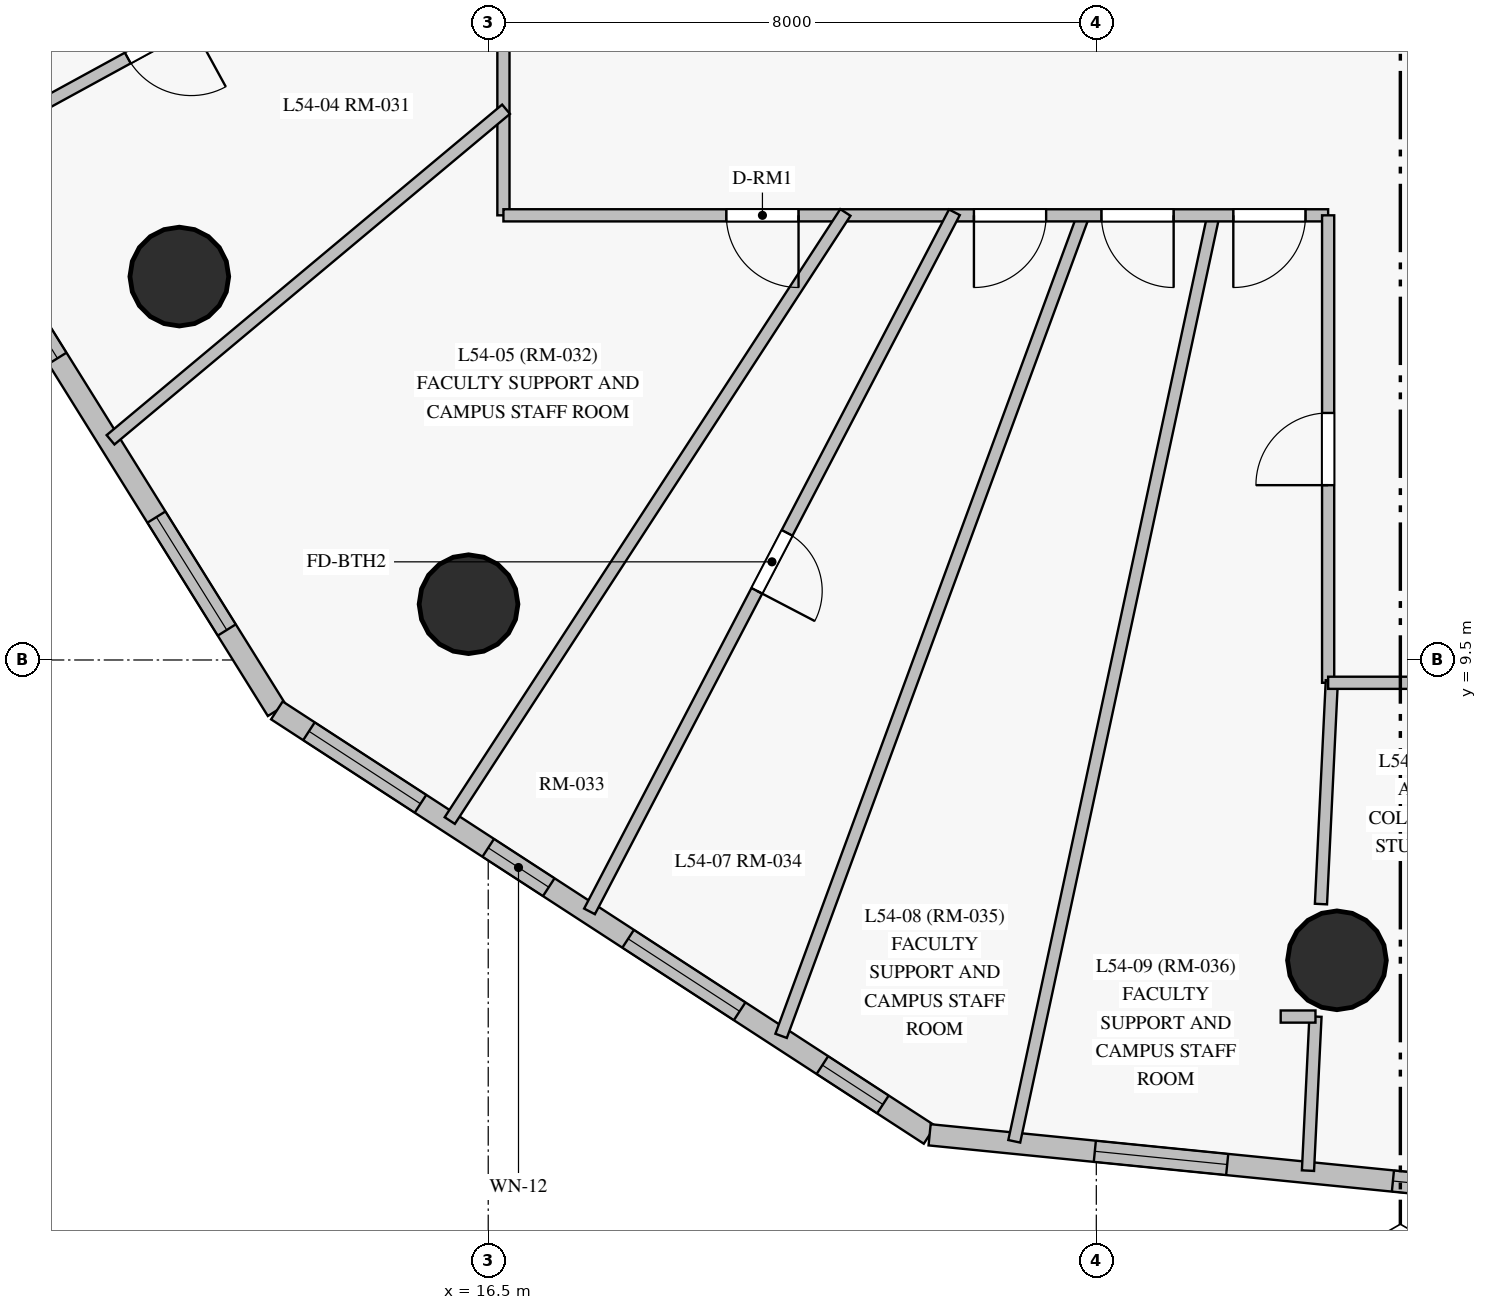
"""IFC4 building model, lengths in metres.
Left out: names, types, materials, properties, quantities, classifications, styles, units other than length and angle.
Written with IfcOpenShell. Run it as: python <this file> out.ifc"""

import sys

from ifc_helpers import new_model, si_unit, direction, frame, frame_2d, origin, origin_with_axes, origin_2d, place, context, subcontext, project, spatial, rectangle, circle, extrude, source, transform, mapped, element, fill, save


model = new_model("IFC4")
c1 = context("Model", 3, precision=1e-05, world=origin(), true_north=direction((0.0, 1.0)))
c2 = subcontext(c1, "Body", "Model", "MODEL_VIEW")
j1 = project(units=[si_unit("LENGTHUNIT", "METRE"), si_unit("PLANEANGLEUNIT", "RADIAN")], contexts=[c1])
p1 = place(None, origin())
s1 = spatial("IfcSite", under=j1, at=p1, CompositionType="ELEMENT")
p2 = place(p1, origin())
s2 = spatial("IfcBuilding", under=s1, at=p2, CompositionType="ELEMENT")
p3 = place(p2, frame((0.0, 0.0, 187.05)))
s3 = spatial("IfcBuildingStorey", under=s2, at=p3, CompositionType="ELEMENT", Elevation=187.05)
m1 = source(origin_with_axes(), c2, "Body", "SweptSolid", [
    extrude(circle(Radius=0.65, at=origin_2d()), origin(), (0.0, 0.0, 1.0), 3.05),
])
for number, where, z_axis, x_axis in (
    (1, (12.436, 14.544, 0.0), (0.0, 0.0, 1.0), (1.0, 0.0, 0.0)),
    (2, (16.241, 10.234, 0.0), (0.0, 0.0, 1.0), (1.0, 0.0, 0.0)),
    (3, (27.666, 5.549, 0.0), (0.0, 0.0, 1.0), (1.0, 0.0, 0.0)),
):
    element("IfcColumn", number, at=place(p3, frame(where, z_axis=z_axis, x_axis=x_axis)), inside=s3, PredefinedType="COLUMN", context=c2, shape_type="MappedRepresentation", body=[
        mapped(m1, transform((0.0, 0.0, 0.0), scale=1.0)),
    ])
p4 = place(p3, frame((6.184, 20.929, 0.0), z_axis=(0.0, 0.0, 1.0), x_axis=(0.52888179639, -0.848695496304, 0.0)))
e4 = element("IfcWall", 4, at=p4, inside=s3, PredefinedType="SOLIDWALL", context=c2, shape_type="SweptSolid", body=[
    extrude(rectangle(XDim=14.248, YDim=0.28, at=frame_2d((7.124, 0.0))), origin(), (0.0, 0.0, 1.0), 2.825),
])
p5 = place(p4, frame((2.403, 0.0, 0.85)))
e5 = element("IfcOpeningElement", 5, at=p5, cuts=e4, PredefinedType="OPENING", context=c2, shape_type="SweptSolid", body=[
    extrude(rectangle(XDim=1.75, YDim=1.65, at=frame_2d((0.875, 0.825))), frame((0.0, 0.15, 0.0), z_axis=(0.0, -1.0, 0.0), x_axis=(1.0, 0.0, 0.0)), (0.0, 0.0, 1.0), 0.3),
])
p6 = place(p4, frame((7.04, 0.0, 0.85)))
e6 = element("IfcOpeningElement", 6, at=p6, cuts=e4, PredefinedType="OPENING", context=c2, shape_type="SweptSolid", body=[
    extrude(rectangle(XDim=1.75, YDim=1.65, at=frame_2d((0.875, 0.825))), frame((0.0, 0.15, 0.0), z_axis=(0.0, -1.0, 0.0), x_axis=(1.0, 0.0, 0.0)), (0.0, 0.0, 1.0), 0.3),
])
p7 = place(p4, frame((11.251, 0.0, 0.85)))
e7 = element("IfcOpeningElement", 7, at=p7, cuts=e4, PredefinedType="OPENING", context=c2, shape_type="SweptSolid", body=[
    extrude(rectangle(XDim=1.75, YDim=1.65, at=frame_2d((0.875, 0.825))), frame((0.0, 0.15, 0.0), z_axis=(0.0, -1.0, 0.0), x_axis=(1.0, 0.0, 0.0)), (0.0, 0.0, 1.0), 0.3),
])
p8 = place(p3, frame((13.719, 8.837, 0.0), z_axis=(0.0, 0.0, 1.0), x_axis=(0.838379351777, -0.545087206339, 0.0)))
e8 = element("IfcWall", 8, at=p8, inside=s3, PredefinedType="SOLIDWALL", context=c2, shape_type="SweptSolid", body=[
    extrude(rectangle(XDim=10.243, YDim=0.28, at=frame_2d((5.122, 0.0))), origin(), (0.0, 0.0, 1.0), 2.825),
])
p9 = place(p8, frame((0.503, 0.0, 0.85)))
e9 = element("IfcOpeningElement", 9, at=p9, cuts=e8, PredefinedType="OPENING", context=c2, shape_type="SweptSolid", body=[
    extrude(rectangle(XDim=1.75, YDim=1.65, at=frame_2d((0.875, 0.825))), frame((0.0, 0.15, 0.0), z_axis=(0.0, -1.0, 0.0), x_axis=(1.0, 0.0, 0.0)), (0.0, 0.0, 1.0), 0.3),
])
p10 = place(p8, frame((3.316, 0.0, 0.85)))
e10 = element("IfcOpeningElement", 10, at=p10, cuts=e8, PredefinedType="OPENING", context=c2, shape_type="SweptSolid", body=[
    extrude(rectangle(XDim=0.95, YDim=1.5, at=frame_2d((0.475, 0.75))), frame((0.0, 0.15, 0.0), z_axis=(0.0, -1.0, 0.0), x_axis=(1.0, 0.0, 0.0)), (0.0, 0.0, 1.0), 0.3),
])
p11 = place(p8, frame((5.512, 0.0, 0.85)))
e11 = element("IfcOpeningElement", 11, at=p11, cuts=e8, PredefinedType="OPENING", context=c2, shape_type="SweptSolid", body=[
    extrude(rectangle(XDim=1.75, YDim=1.65, at=frame_2d((0.875, 0.825))), frame((0.0, 0.15, 0.0), z_axis=(0.0, -1.0, 0.0), x_axis=(1.0, 0.0, 0.0)), (0.0, 0.0, 1.0), 0.3),
])
p12 = place(p8, frame((8.56, 0.0, 0.85)))
e12 = element("IfcOpeningElement", 12, at=p12, cuts=e8, PredefinedType="OPENING", context=c2, shape_type="SweptSolid", body=[
    extrude(rectangle(XDim=0.95, YDim=1.5, at=frame_2d((0.475, 0.75))), frame((0.0, 0.15, 0.0), z_axis=(0.0, -1.0, 0.0), x_axis=(1.0, 0.0, 0.0)), (0.0, 0.0, 1.0), 0.3),
])
p13 = place(p3, frame((22.307, 3.253, 0.0), z_axis=(0.0, 0.0, 1.0), x_axis=(0.995061275338, -0.099262572617, 0.0)))
e13 = element("IfcWall", 13, at=p13, inside=s3, PredefinedType="SOLIDWALL", context=c2, shape_type="SweptSolid", body=[
    extrude(rectangle(XDim=13.132, YDim=0.28, at=frame_2d((6.566, 0.0))), origin(), (0.0, 0.0, 1.0), 2.825),
])
p14 = place(p13, frame((2.184, 0.0, 0.85)))
e14 = element("IfcOpeningElement", 14, at=p14, cuts=e13, PredefinedType="OPENING", context=c2, shape_type="SweptSolid", body=[
    extrude(rectangle(XDim=1.75, YDim=1.65, at=frame_2d((0.875, 0.825))), frame((0.0, 0.15, 0.0), z_axis=(0.0, -1.0, 0.0), x_axis=(1.0, 0.0, 0.0)), (0.0, 0.0, 1.0), 0.3),
])
p15 = place(p13, frame((6.125, 0.0, 0.85)))
e15 = element("IfcOpeningElement", 15, at=p15, cuts=e13, PredefinedType="OPENING", context=c2, shape_type="SweptSolid", body=[
    extrude(rectangle(XDim=1.75, YDim=1.65, at=frame_2d((0.875, 0.825))), frame((0.0, 0.15, 0.0), z_axis=(0.0, -1.0, 0.0), x_axis=(1.0, 0.0, 0.0)), (0.0, 0.0, 1.0), 0.3),
])
p16 = place(p13, frame((9.827, 0.0, 0.85)))
e16 = element("IfcOpeningElement", 16, at=p16, cuts=e13, PredefinedType="OPENING", context=c2, shape_type="SweptSolid", body=[
    extrude(rectangle(XDim=1.75, YDim=1.65, at=frame_2d((0.875, 0.825))), frame((0.0, 0.15, 0.0), z_axis=(0.0, -1.0, 0.0), x_axis=(1.0, 0.0, 0.0)), (0.0, 0.0, 1.0), 0.3),
])
p17 = place(p3, frame((16.7, 15.35, 0.0), z_axis=(0.0, 0.0, 1.0), x_axis=(0.0, 1.0, 0.0)))
e17 = element("IfcWall", 17, at=p17, inside=s3, PredefinedType="PARTITIONING", context=c2, shape_type="SweptSolid", body=[
    extrude(rectangle(XDim=22.3, YDim=0.16, at=frame_2d((11.15, 0.0))), origin(), (0.0, 0.0, 1.0), 2.275),
])
p18 = place(p17, frame((10.435, 0.0, 0.0)))
e18 = element("IfcOpeningElement", 18, at=p18, cuts=e17, PredefinedType="OPENING", context=c2, shape_type="SweptSolid", body=[
    extrude(rectangle(XDim=0.96, YDim=2.15, at=frame_2d((0.48, 1.075))), frame((0.0, 0.09, 0.0), z_axis=(0.0, -1.0, 0.0), x_axis=(1.0, 0.0, 0.0)), (0.0, 0.0, 1.0), 0.18),
])
p19 = place(p17, frame((2.469, 0.0, 0.0)))
e19 = element("IfcOpeningElement", 19, at=p19, cuts=e17, PredefinedType="OPENING", context=c2, shape_type="SweptSolid", body=[
    extrude(rectangle(XDim=0.95, YDim=2.15, at=frame_2d((0.475, 1.075))), frame((0.0, 0.09, 0.0), z_axis=(0.0, -1.0, 0.0), x_axis=(1.0, 0.0, 0.0)), (0.0, 0.0, 1.0), 0.18),
])
p20 = place(p17, frame((16.25, 0.0, 0.0)))
e20 = element("IfcOpeningElement", 20, at=p20, cuts=e17, PredefinedType="OPENING", context=c2, shape_type="SweptSolid", body=[
    extrude(rectangle(XDim=0.95, YDim=2.15, at=frame_2d((0.475, 1.075))), frame((0.0, 0.09, 0.0), z_axis=(0.0, -1.0, 0.0), x_axis=(1.0, 0.0, 0.0)), (0.0, 0.0, 1.0), 0.18),
])
p21 = place(p17, frame((13.98, 0.0, 0.0)))
e21 = element("IfcOpeningElement", 21, at=p21, cuts=e17, PredefinedType="OPENING", context=c2, shape_type="SweptSolid", body=[
    extrude(rectangle(XDim=0.95, YDim=2.15, at=frame_2d((0.475, 1.075))), frame((0.0, 0.09, 0.0), z_axis=(0.0, -1.0, 0.0), x_axis=(1.0, 0.0, 0.0)), (0.0, 0.0, 1.0), 0.18),
])
p22 = place(p3, frame((26.047, 15.379, 0.0), z_axis=(0.0, 0.0, 1.0), x_axis=(-0.21026984846, -0.977643386327, 0.0)))
e22 = element("IfcWall", 22, at=p22, inside=s3, PredefinedType="PARTITIONING", context=c2, shape_type="SweptSolid", body=[
    extrude(rectangle(XDim=12.491, YDim=0.16, at=frame_2d((6.246, 0.0))), origin(), (0.0, 0.0, 1.0), 2.825),
])
p23 = place(p3, frame((24.34, 15.378, 0.0), z_axis=(0.0, 0.0, 1.0), x_axis=(-0.345603339297, -0.938380696661, 0.0)))
e23 = element("IfcWall", 23, at=p23, inside=s3, PredefinedType="PARTITIONING", context=c2, shape_type="SweptSolid", body=[
    extrude(rectangle(XDim=11.534, YDim=0.16, at=frame_2d((5.767, 0.0))), origin(), (0.0, 0.0, 1.0), 2.825),
])
p24 = place(p3, frame((27.55, 15.35, 0.0), z_axis=(0.0, 0.0, 1.0), x_axis=(-1.0, 0.0, 0.0)))
e24 = element("IfcWall", 24, at=p24, inside=s3, PredefinedType="PARTITIONING", context=c2, shape_type="SweptSolid", body=[
    extrude(rectangle(XDim=10.85, YDim=0.16, at=frame_2d((5.425, 0.0))), origin(), (0.0, 0.0, 1.0), 2.375),
])
p25 = place(p24, frame((6.968, 0.0, 0.0)))
e25 = element("IfcOpeningElement", 25, at=p25, cuts=e24, PredefinedType="OPENING", context=c2, shape_type="SweptSolid", body=[
    extrude(rectangle(XDim=0.95, YDim=2.15, at=frame_2d((0.475, 1.075))), frame((0.0, 0.09, 0.0), z_axis=(0.0, -1.0, 0.0), x_axis=(1.0, 0.0, 0.0)), (0.0, 0.0, 1.0), 0.18),
])
p26 = place(p24, frame((3.71, 0.0, 0.0)))
e26 = element("IfcOpeningElement", 26, at=p26, cuts=e24, PredefinedType="OPENING", context=c2, shape_type="SweptSolid", body=[
    extrude(rectangle(XDim=0.95, YDim=2.15, at=frame_2d((0.475, 1.075))), frame((0.0, 0.09, 0.0), z_axis=(0.0, -1.0, 0.0), x_axis=(1.0, 0.0, 0.0)), (0.0, 0.0, 1.0), 0.18),
])
p27 = place(p24, frame((2.032, 0.0, 0.0)))
e27 = element("IfcOpeningElement", 27, at=p27, cuts=e24, PredefinedType="OPENING", context=c2, shape_type="SweptSolid", body=[
    extrude(rectangle(XDim=0.95, YDim=2.15, at=frame_2d((0.475, 1.075))), frame((0.0, 0.09, 0.0), z_axis=(0.0, -1.0, 0.0), x_axis=(1.0, 0.0, 0.0)), (0.0, 0.0, 1.0), 0.18),
])
p28 = place(p24, frame((0.298, 0.0, 0.0)))
e28 = element("IfcOpeningElement", 28, at=p28, cuts=e24, PredefinedType="OPENING", context=c2, shape_type="SweptSolid", body=[
    extrude(rectangle(XDim=0.95, YDim=2.15, at=frame_2d((0.475, 1.075))), frame((0.0, 0.09, 0.0), z_axis=(0.0, -1.0, 0.0), x_axis=(1.0, 0.0, 0.0)), (0.0, 0.0, 1.0), 0.18),
])
p29 = place(p3, frame((22.633, 15.39, 0.0), z_axis=(0.0, 0.0, 1.0), x_axis=(-0.462733274977, -0.886497555682, 0.0)))
e29 = element("IfcWall", 29, at=p29, inside=s3, PredefinedType="PARTITIONING", context=c2, shape_type="SweptSolid", body=[
    extrude(rectangle(XDim=10.375, YDim=0.16, at=frame_2d((5.188, 0.0))), origin(), (0.0, 0.0, 1.0), 2.825),
])
p30 = place(p29, frame((4.757, 0.0, 0.0)))
e30 = element("IfcOpeningElement", 30, at=p30, cuts=e29, PredefinedType="OPENING", context=c2, shape_type="SweptSolid", body=[
    extrude(rectangle(XDim=0.86, YDim=2.04, at=frame_2d((0.43, 1.02))), frame((0.0, 0.09, 0.0), z_axis=(0.0, -1.0, 0.0), x_axis=(1.0, 0.0, 0.0)), (0.0, 0.0, 1.0), 0.18),
])
p31 = place(p3, frame((21.199, 15.388, 0.0), z_axis=(0.0, 0.0, 1.0), x_axis=(-0.545344356307, -0.838212105045, 0.0)))
e31 = element("IfcWall", 31, at=p31, inside=s3, PredefinedType="PARTITIONING", context=c2, shape_type="SweptSolid", body=[
    extrude(rectangle(XDim=9.544, YDim=0.16, at=frame_2d((4.772, 0.0))), origin(), (0.0, 0.0, 1.0), 2.825),
])
p32 = place(p3, frame((16.735, 16.745, 0.0), z_axis=(0.0, 0.0, 1.0), x_axis=(-0.767314553754, -0.641270906558, 0.0)))
e32 = element("IfcWall", 32, at=p32, inside=s3, PredefinedType="PARTITIONING", context=c2, shape_type="SweptSolid", body=[
    extrude(rectangle(XDim=6.781, YDim=0.16, at=frame_2d((3.391, 0.0))), origin(), (0.0, 0.0, 1.0), 2.275),
])
p33 = place(p3, frame((15.228, 19.316, 0.0), z_axis=(0.0, 0.0, 1.0), x_axis=(-0.877523935838, -0.479532837282, 0.0)))
e33 = element("IfcWall", 33, at=p33, inside=s3, PredefinedType="PARTITIONING", context=c2, shape_type="SweptSolid", body=[
    extrude(rectangle(XDim=6.809, YDim=0.16, at=frame_2d((3.404, 0.0))), origin(), (0.0, 0.0, 1.0), 2.825),
])
p34 = place(p33, frame((3.004, 0.0, 0.0)))
e34 = element("IfcOpeningElement", 34, at=p34, cuts=e33, PredefinedType="OPENING", context=c2, shape_type="SweptSolid", body=[
    extrude(rectangle(XDim=0.95, YDim=2.15, at=frame_2d((0.475, 1.075))), frame((0.0, 0.09, 0.0), z_axis=(0.0, -1.0, 0.0), x_axis=(1.0, 0.0, 0.0)), (0.0, 0.0, 1.0), 0.18),
])
p35 = place(p3, frame((27.55, 9.2, 0.0), z_axis=(0.0, 0.0, 1.0), x_axis=(0.0, 1.0, 0.0)))
e35 = element("IfcWall", 35, at=p35, inside=s3, PredefinedType="PARTITIONING", context=c2, shape_type="SweptSolid", body=[
    extrude(rectangle(XDim=6.15, YDim=0.16, at=frame_2d((3.075, 0.0))), origin(), (0.0, 0.0, 1.0), 2.275),
])
p36 = place(p35, frame((2.6, 0.0, 0.0)))
e36 = element("IfcOpeningElement", 36, at=p36, cuts=e35, PredefinedType="OPENING", context=c2, shape_type="SweptSolid", body=[
    extrude(rectangle(XDim=0.95, YDim=2.15, at=frame_2d((0.475, 1.075))), frame((0.0, 0.09, 0.0), z_axis=(0.0, -1.0, 0.0), x_axis=(1.0, 0.0, 0.0)), (0.0, 0.0, 1.0), 0.18),
])
p37 = place(p3, frame((27.599, 9.23, 0.0), z_axis=(0.0, 0.0, 1.0), x_axis=(-0.048672114697, -0.998814810288, 0.0)))
e37 = element("IfcWall", 37, at=p37, inside=s3, PredefinedType="PARTITIONING", context=c2, shape_type="SweptSolid", body=[
    extrude(rectangle(XDim=2.944, YDim=0.16, at=frame_2d((1.472, 0.0))), origin(), (0.0, 0.0, 1.0), 2.275),
])
p38 = place(p3, frame((30.387, 9.2, 0.0), z_axis=(0.0, 0.0, 1.0), x_axis=(-1.0, 0.0, 0.0)))
e38 = element("IfcWall", 38, at=p38, inside=s3, PredefinedType="PARTITIONING", context=c2, shape_type="SweptSolid", body=[
    extrude(rectangle(XDim=2.837, YDim=0.16, at=frame_2d((1.418, 0.0))), origin(), (0.0, 0.0, 1.0), 2.495),
])
p39 = place(p3, frame((27.384, 4.809, 0.0), z_axis=(0.0, 0.0, 1.0), x_axis=(-0.048719626645, -0.998812493904, 0.0)))
e39 = element("IfcWall", 39, at=p39, inside=s3, PredefinedType="PARTITIONING", context=c2, shape_type="SweptSolid", body=[
    extrude(rectangle(XDim=2.03, YDim=0.16, at=frame_2d((1.015, 0.0))), origin(), (0.0, 0.0, 1.0), 2.825),
])
p40 = place(p3, frame((26.926, 4.809, 0.0), z_axis=(0.0, 0.0, 1.0), x_axis=(1.0, 0.0, 0.0)))
e40 = element("IfcWall", 40, at=p40, inside=s3, PredefinedType="PARTITIONING", context=c2, shape_type="SweptSolid", body=[
    extrude(rectangle(XDim=0.458, YDim=0.16, at=frame_2d((0.229, 0.0))), origin(), (0.0, 0.0, 1.0), 2.825),
])
m2 = source(origin_with_axes(), c2, "Body", "SweptSolid", [
    extrude(rectangle(XDim=1.75, YDim=1.65, at=frame_2d((0.875, 0.825))), frame((0.0, 0.03, 0.0), z_axis=(0.0, -1.0, 0.0), x_axis=(1.0, 0.0, 0.0)), (0.0, 0.0, 1.0), 0.06),
])
p41 = place(p6, origin())
e41 = element("IfcWindow", 41, at=p41, inside=s3, PartitioningType="SINGLE_PANEL", PredefinedType="WINDOW", context=c2, shape_type="MappedRepresentation", body=[
    mapped(m2, transform((0.0, 0.0, 0.0), scale=1.0)),
])
fill(e6, e41)
p42 = place(p7, origin())
e42 = element("IfcWindow", 42, at=p42, inside=s3, PartitioningType="SINGLE_PANEL", PredefinedType="WINDOW", context=c2, shape_type="MappedRepresentation", body=[
    mapped(m2, transform((0.0, 0.0, 0.0), scale=1.0)),
])
fill(e7, e42)
p43 = place(p9, origin())
e43 = element("IfcWindow", 43, at=p43, inside=s3, PartitioningType="SINGLE_PANEL", PredefinedType="WINDOW", context=c2, shape_type="MappedRepresentation", body=[
    mapped(m2, transform((0.0, 0.0, 0.0), scale=1.0)),
])
fill(e9, e43)
m3 = source(origin_with_axes(), c2, "Body", "SweptSolid", [
    extrude(rectangle(XDim=0.95, YDim=1.5, at=frame_2d((0.475, 0.75))), frame((0.0, 0.03, 0.0), z_axis=(0.0, -1.0, 0.0), x_axis=(1.0, 0.0, 0.0)), (0.0, 0.0, 1.0), 0.06),
])
p44 = place(p10, origin())
e44 = element("IfcWindow", 44, at=p44, inside=s3, PartitioningType="SINGLE_PANEL", PredefinedType="WINDOW", context=c2, shape_type="MappedRepresentation", body=[
    mapped(m3, transform((0.0, 0.0, 0.0), scale=1.0)),
])
fill(e10, e44)
p45 = place(p11, origin())
e45 = element("IfcWindow", 45, at=p45, inside=s3, PartitioningType="SINGLE_PANEL", PredefinedType="WINDOW", context=c2, shape_type="MappedRepresentation", body=[
    mapped(m2, transform((0.0, 0.0, 0.0), scale=1.0)),
])
fill(e11, e45)
p46 = place(p12, origin())
e46 = element("IfcWindow", 46, at=p46, inside=s3, PartitioningType="SINGLE_PANEL", PredefinedType="WINDOW", context=c2, shape_type="MappedRepresentation", body=[
    mapped(m3, transform((0.0, 0.0, 0.0), scale=1.0)),
])
fill(e12, e46)
p47 = place(p14, origin())
e47 = element("IfcWindow", 47, at=p47, inside=s3, PartitioningType="SINGLE_PANEL", PredefinedType="WINDOW", context=c2, shape_type="MappedRepresentation", body=[
    mapped(m2, transform((0.0, 0.0, 0.0), scale=1.0)),
])
fill(e14, e47)
p48 = place(p15, origin())
e48 = element("IfcWindow", 48, at=p48, inside=s3, PartitioningType="SINGLE_PANEL", PredefinedType="WINDOW", context=c2, shape_type="MappedRepresentation", body=[
    mapped(m2, transform((0.0, 0.0, 0.0), scale=1.0)),
])
fill(e15, e48)
m4 = source(origin_with_axes(), c2, "Body", "SweptSolid", [
    extrude(rectangle(XDim=0.95, YDim=2.15, at=frame_2d((0.475, 1.075))), frame((0.0, 0.025, 0.0), z_axis=(0.0, -1.0, 0.0), x_axis=(1.0, 0.0, 0.0)), (0.0, 0.0, 1.0), 0.05),
])
p49 = place(p25, origin())
e49 = element("IfcDoor", 49, at=p49, inside=s3, OperationType="SINGLE_SWING_LEFT", PredefinedType="DOOR", context=c2, shape_type="MappedRepresentation", body=[
    mapped(m4, transform((0.0, 0.0, 0.0), scale=1.0)),
])
fill(e25, e49)
p50 = place(p26, origin())
e50 = element("IfcDoor", 50, at=p50, inside=s3, OperationType="SINGLE_SWING_RIGHT", PredefinedType="DOOR", context=c2, shape_type="MappedRepresentation", body=[
    mapped(m4, transform((0.0, 0.0, 0.0), scale=1.0)),
])
fill(e26, e50)
p51 = place(p27, origin())
e51 = element("IfcDoor", 51, at=p51, inside=s3, OperationType="SINGLE_SWING_LEFT", PredefinedType="DOOR", context=c2, shape_type="MappedRepresentation", body=[
    mapped(m4, transform((0.0, 0.0, 0.0), scale=1.0)),
])
fill(e27, e51)
p52 = place(p28, origin())
e52 = element("IfcDoor", 52, at=p52, inside=s3, OperationType="SINGLE_SWING_RIGHT", PredefinedType="DOOR", context=c2, shape_type="MappedRepresentation", body=[
    mapped(m4, transform((0.0, 0.0, 0.0), scale=1.0)),
])
fill(e28, e52)
p53 = place(p36, origin())
e53 = element("IfcDoor", 53, at=p53, inside=s3, OperationType="SINGLE_SWING_LEFT", PredefinedType="DOOR", context=c2, shape_type="MappedRepresentation", body=[
    mapped(m4, transform((0.0, 0.0, 0.0), scale=1.0)),
])
fill(e36, e53)
p54 = place(p34, origin())
e54 = element("IfcDoor", 54, at=p54, inside=s3, OperationType="SINGLE_SWING_LEFT", PredefinedType="DOOR", context=c2, shape_type="MappedRepresentation", body=[
    mapped(m4, transform((0.0, 0.0, 0.0), scale=1.0)),
])
fill(e34, e54)
m5 = source(origin_with_axes(), c2, "Body", "SweptSolid", [
    extrude(rectangle(XDim=0.86, YDim=2.04, at=frame_2d((0.43, 1.02))), frame((0.0, 0.025, 0.0), z_axis=(0.0, -1.0, 0.0), x_axis=(1.0, 0.0, 0.0)), (0.0, 0.0, 1.0), 0.05),
])
p55 = place(p30, origin())
e55 = element("IfcDoor", 55, at=p55, inside=s3, OperationType="SINGLE_SWING_RIGHT", PredefinedType="DOOR", context=c2, shape_type="MappedRepresentation", body=[
    mapped(m5, transform((0.0, 0.0, 0.0), scale=1.0)),
])
fill(e30, e55)
save(model, sys.argv[1])
